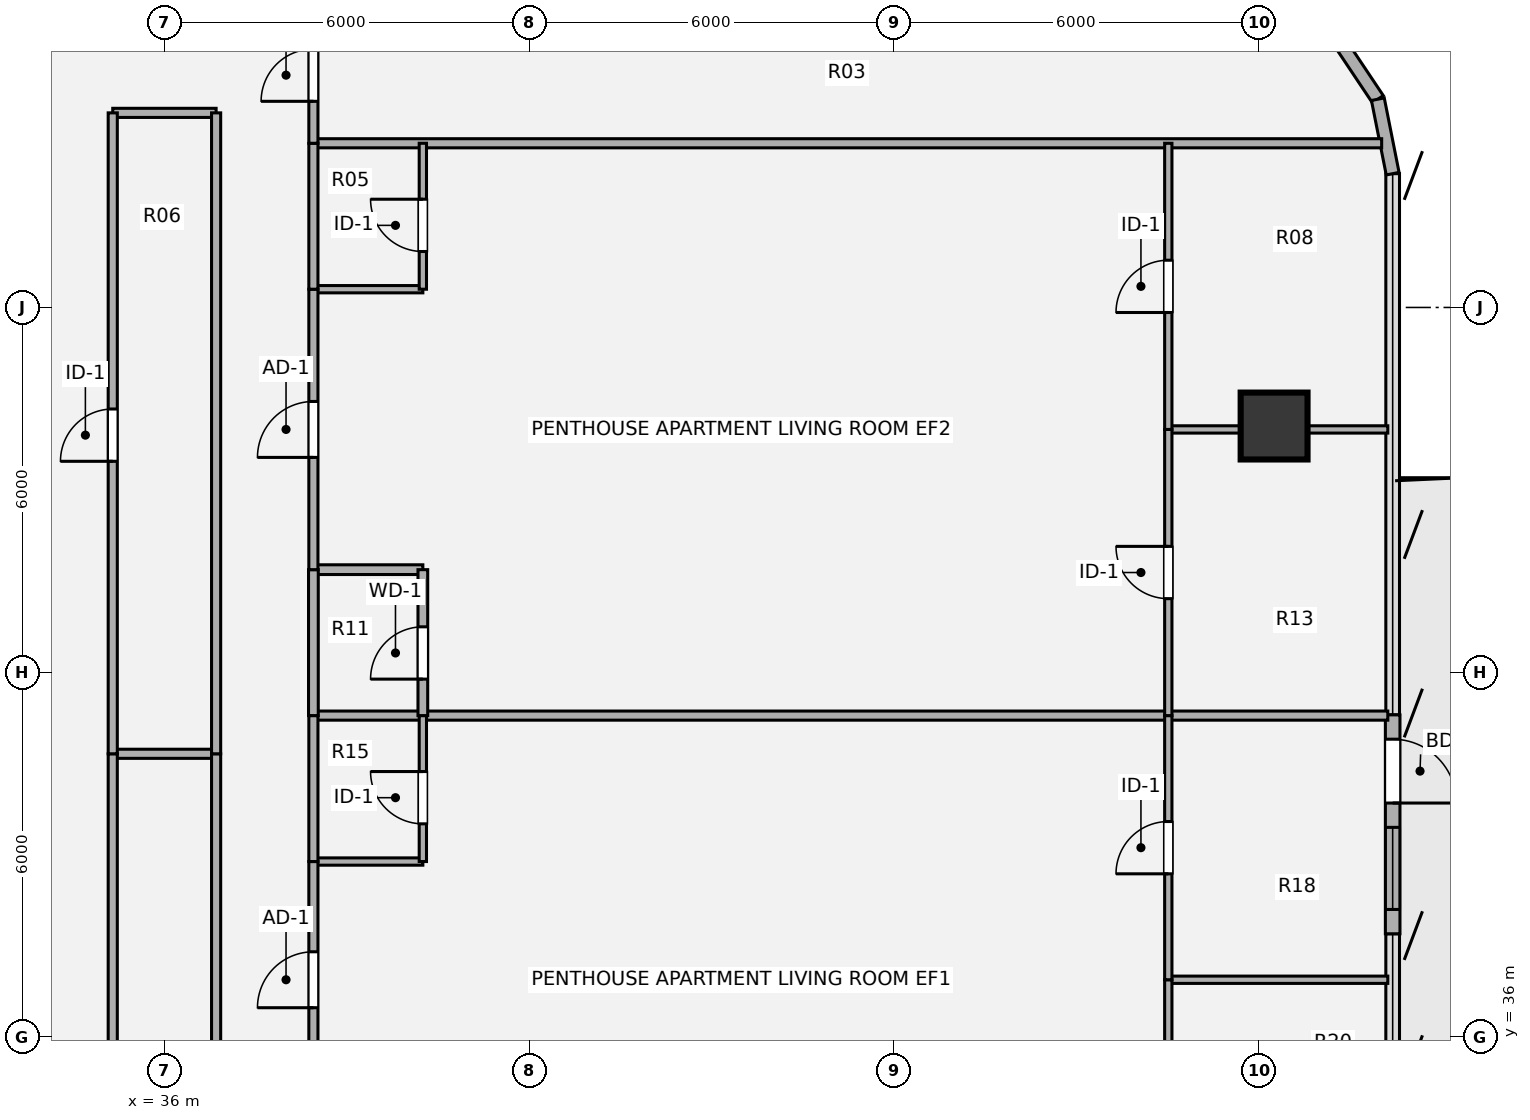
"""IFC4 building model, lengths in metres.
Left out: names, types, materials, properties, quantities, classifications, styles, units other than length and angle.
Written with IfcOpenShell. Run it as: python <this file> out.ifc"""

import sys

from ifc_helpers import new_model, si_unit, direction, frame, frame_2d, origin, origin_2d, place, context, subcontext, project, spatial, rectangle, hollow_circle, extrude, source, transform, mapped, element, fill, save


model = new_model("IFC4")
c1 = context("Model", 3, precision=1e-05, world=origin(), true_north=direction((0.0, 1.0)))
c2 = subcontext(c1, "Body", "Model", "MODEL_VIEW")
j1 = project(units=[si_unit("LENGTHUNIT", "METRE"), si_unit("PLANEANGLEUNIT", "RADIAN")], contexts=[c1])
p1 = place(None, origin())
s1 = spatial("IfcSite", under=j1, at=p1, CompositionType="ELEMENT")
p2 = place(p1, origin())
s2 = spatial("IfcBuilding", under=s1, at=p2, CompositionType="ELEMENT")
p3 = place(p2, frame((0.0, 0.0, 163.98)))
s3 = spatial("IfcBuildingStorey", under=s2, at=p3, CompositionType="ELEMENT", Elevation=163.98)
m1 = source(origin(), c2, "Body", "SweptSolid", [
    extrude(hollow_circle(Radius=0.55, WallThickness=0.04, at=origin_2d()), origin(), (0.0, 0.0, 1.0), 3.78),
])
p4 = place(p3, frame((54.25, 46.05, 0.0), z_axis=(0.0, 0.0, 1.0), x_axis=(1.0, 0.0, 0.0)))
e1 = element("IfcColumn", 1, at=p4, inside=s3, PredefinedType="COLUMN", context=c2, shape_type="MappedRepresentation", body=[
    mapped(m1, transform((0.0, 0.0, 0.0), x_axis=(1.0, 0.0, 0.0), y_axis=(0.0, 1.0, 0.0), z_axis=(0.0, 0.0, 1.0), scale=1.0)),
])
for number, where, z_axis, x_axis in (
    (2, (55.263, 52.463, 0.0), (0.0, 0.0, 1.0), (0.556, -0.831, 0.0)),
    (3, (55.956, 51.425, 0.0), (0.0, 0.0, 1.0), (0.195, -0.981, 0.0)),
):
    element("IfcWall", number, at=place(p3, frame(where, z_axis=z_axis, x_axis=x_axis)), inside=s3, PredefinedType="SOLIDWALL", context=c2, shape_type="SweptSolid", body=[
        extrude(rectangle(XDim=1.249, YDim=0.215, at=frame_2d((0.624, 0.0))), origin(), (0.0, 0.0, 1.0), 3.53),
    ])
p5 = place(p3, frame((56.2, 41.3, 0.0), z_axis=(0.0, 0.0, 1.0), x_axis=(0.0, -1.0, 0.0)))
e4 = element("IfcWall", 4, at=p5, inside=s3, PredefinedType="SOLIDWALL", context=c2, shape_type="SweptSolid", body=[
    extrude(rectangle(XDim=3.6, YDim=0.24, at=frame_2d((1.8, 0.0))), origin(), (0.0, 0.0, 1.0), 3.53),
])
p6 = place(p5, frame((0.4, 0.0, 0.0)))
e5 = element("IfcOpeningElement", 5, at=p6, cuts=e4, PredefinedType="OPENING", context=c2, shape_type="SweptSolid", body=[
    extrude(rectangle(XDim=1.05, YDim=2.15, at=origin_2d()), frame((0.525, 0.13, 1.075), z_axis=(0.0, -1.0, 0.0), x_axis=(1.0, 0.0, 0.0)), (0.0, 0.0, 1.0), 0.26),
])
p7 = place(p5, frame((1.85, 0.0, 0.85)))
e6 = element("IfcOpeningElement", 6, at=p7, cuts=e4, PredefinedType="OPENING", context=c2, shape_type="SweptSolid", body=[
    extrude(rectangle(XDim=1.35, YDim=1.35, at=origin_2d()), frame((0.675, 0.13, 0.675), z_axis=(0.0, -1.0, 0.0), x_axis=(1.0, 0.0, 0.0)), (0.0, 0.0, 1.0), 0.26),
])
p8 = place(p3, frame((52.51, 36.944, 0.0), z_axis=(0.0, 0.0, 1.0), x_axis=(1.0, 0.0, 0.0)))
e7 = element("IfcWall", 7, at=p8, inside=s3, PredefinedType="PARTITIONING", context=c2, shape_type="SweptSolid", body=[
    extrude(rectangle(XDim=3.61, YDim=0.12, at=frame_2d((1.805, 0.0))), origin(), (0.0, 0.0, 1.0), 2.982),
])
p9 = place(p3, frame((38.45, 38.888, 0.0), z_axis=(0.0, 0.0, 1.0), x_axis=(1.0, 0.0, 0.0)))
e8 = element("IfcWall", 8, at=p9, inside=s3, PredefinedType="PARTITIONING", context=c2, shape_type="SweptSolid", body=[
    extrude(rectangle(XDim=1.8, YDim=0.12, at=frame_2d((0.9, 0.0))), origin(), (0.0, 0.0, 1.0), 3.259),
])
p10 = place(p3, frame((35.15, 40.66, 0.0), z_axis=(0.0, 0.0, 1.0), x_axis=(1.0, 0.0, 0.0)))
e9 = element("IfcWall", 9, at=p10, inside=s3, PredefinedType="PARTITIONING", context=c2, shape_type="SweptSolid", body=[
    extrude(rectangle(XDim=1.7, YDim=0.15, at=frame_2d((0.85, 0.0))), origin(), (0.0, 0.0, 1.0), 3.259),
])
p11 = place(p3, frame((38.45, 41.288, 0.0), z_axis=(0.0, 0.0, 1.0), x_axis=(1.0, 0.0, 0.0)))
e10 = element("IfcWall", 10, at=p11, inside=s3, PredefinedType="PARTITIONING", context=c2, shape_type="SweptSolid", body=[
    extrude(rectangle(XDim=17.67, YDim=0.15, at=frame_2d((8.835, 0.0))), origin(), (0.0, 0.0, 1.0), 2.982),
])
p12 = place(p3, frame((38.45, 43.688, 0.0), z_axis=(0.0, 0.0, 1.0), x_axis=(1.0, 0.0, 0.0)))
e11 = element("IfcWall", 11, at=p12, inside=s3, PredefinedType="PLUMBINGWALL", context=c2, shape_type="SweptSolid", body=[
    extrude(rectangle(XDim=1.8, YDim=0.16, at=frame_2d((0.9, 0.0))), origin(), (0.0, 0.0, 1.0), 3.259),
])
p13 = place(p3, frame((52.51, 45.994, 0.0), z_axis=(0.0, 0.0, 1.0), x_axis=(1.0, 0.0, 0.0)))
e12 = element("IfcWall", 12, at=p13, inside=s3, PredefinedType="PARTITIONING", context=c2, shape_type="SweptSolid", body=[
    extrude(rectangle(XDim=3.61, YDim=0.12, at=frame_2d((1.805, 0.0))), origin(), (0.0, 0.0, 1.0), 2.903),
])
p14 = place(p3, frame((38.45, 48.3, 0.0), z_axis=(0.0, 0.0, 1.0), x_axis=(1.0, 0.0, 0.0)))
e13 = element("IfcWall", 13, at=p14, inside=s3, PredefinedType="PARTITIONING", context=c2, shape_type="SweptSolid", body=[
    extrude(rectangle(XDim=1.8, YDim=0.12, at=frame_2d((0.9, 0.0))), origin(), (0.0, 0.0, 1.0), 3.259),
])
p15 = place(p3, frame((38.45, 50.7, 0.0), z_axis=(0.0, 0.0, 1.0), x_axis=(1.0, 0.0, 0.0)))
e14 = element("IfcWall", 14, at=p15, inside=s3, PredefinedType="PARTITIONING", context=c2, shape_type="SweptSolid", body=[
    extrude(rectangle(XDim=17.569, YDim=0.15, at=frame_2d((8.785, 0.0))), origin(), (0.0, 0.0, 1.0), 3.308),
])
p16 = place(p3, frame((35.15, 51.2, 0.0), z_axis=(0.0, 0.0, 1.0), x_axis=(1.0, 0.0, 0.0)))
e15 = element("IfcWall", 15, at=p16, inside=s3, PredefinedType="PARTITIONING", context=c2, shape_type="SweptSolid", body=[
    extrude(rectangle(XDim=1.7, YDim=0.15, at=frame_2d((0.85, 0.0))), origin(), (0.0, 0.0, 1.0), 3.308),
])
p17 = place(p3, frame((35.15, 25.2, 0.0), z_axis=(0.0, 0.0, 1.0), x_axis=(0.0, 1.0, 0.0)))
e16 = element("IfcWall", 16, at=p17, inside=s3, PredefinedType="PARTITIONING", context=c2, shape_type="SweptSolid", body=[
    extrude(rectangle(XDim=15.46, YDim=0.15, at=frame_2d((7.73, 0.0))), origin(), (0.0, 0.0, 1.0), 3.5),
])
p18 = place(p3, frame((35.15, 40.66, 0.0), z_axis=(0.0, 0.0, 1.0), x_axis=(0.0, 1.0, 0.0)))
e17 = element("IfcWall", 17, at=p18, inside=s3, PredefinedType="PARTITIONING", context=c2, shape_type="SweptSolid", body=[
    extrude(rectangle(XDim=10.54, YDim=0.15, at=frame_2d((5.27, 0.0))), origin(), (0.0, 0.0, 1.0), 3.5),
])
p19 = place(p18, frame((4.81, 0.0, 0.0)))
e18 = element("IfcOpeningElement", 18, at=p19, cuts=e17, PredefinedType="OPENING", context=c2, shape_type="SweptSolid", body=[
    extrude(rectangle(XDim=0.86, YDim=2.1, at=origin_2d()), frame((0.43, 0.085, 1.05), z_axis=(0.0, -1.0, 0.0), x_axis=(1.0, 0.0, 0.0)), (0.0, 0.0, 1.0), 0.17),
])
p20 = place(p3, frame((36.85, 25.2, 0.0), z_axis=(0.0, 0.0, 1.0), x_axis=(0.0, 1.0, 0.0)))
e19 = element("IfcWall", 19, at=p20, inside=s3, PredefinedType="PARTITIONING", context=c2, shape_type="SweptSolid", body=[
    extrude(rectangle(XDim=15.46, YDim=0.15, at=frame_2d((7.73, 0.0))), origin(), (0.0, 0.0, 1.0), 3.5),
])
p21 = place(p20, frame((7.205, 0.0, 0.0)))
e20 = element("IfcOpeningElement", 20, at=p21, cuts=e19, PredefinedType="OPENING", context=c2, shape_type="SweptSolid", body=[
    extrude(rectangle(XDim=1.05, YDim=2.1, at=origin_2d()), frame((0.525, 0.085, 1.05), z_axis=(0.0, -1.0, 0.0), x_axis=(1.0, 0.0, 0.0)), (0.0, 0.0, 1.0), 0.17),
])
p22 = place(p3, frame((36.85, 40.66, 0.0), z_axis=(0.0, 0.0, 1.0), x_axis=(0.0, 1.0, 0.0)))
e21 = element("IfcWall", 21, at=p22, inside=s3, PredefinedType="PARTITIONING", context=c2, shape_type="SweptSolid", body=[
    extrude(rectangle(XDim=10.54, YDim=0.15, at=frame_2d((5.27, 0.0))), origin(), (0.0, 0.0, 1.0), 3.5),
])
p23 = place(p3, frame((38.45, 35.0, 0.0), z_axis=(0.0, 0.0, 1.0), x_axis=(0.0, 1.0, 0.0)))
e22 = element("IfcWall", 22, at=p23, inside=s3, PredefinedType="PARTITIONING", context=c2, shape_type="SweptSolid", body=[
    extrude(rectangle(XDim=3.888, YDim=0.15, at=frame_2d((1.944, 0.0))), origin(), (0.0, 0.0, 1.0), 3.5),
])
p24 = place(p23, frame((1.484, 0.0, 0.0)))
e23 = element("IfcOpeningElement", 23, at=p24, cuts=e22, PredefinedType="OPENING", context=c2, shape_type="SweptSolid", body=[
    extrude(rectangle(XDim=0.92, YDim=2.1, at=origin_2d()), frame((0.46, 0.085, 1.05), z_axis=(0.0, -1.0, 0.0), x_axis=(1.0, 0.0, 0.0)), (0.0, 0.0, 1.0), 0.17),
])
p25 = place(p3, frame((38.45, 38.888, 0.0), z_axis=(0.0, 0.0, 1.0), x_axis=(0.0, 1.0, 0.0)))
e24 = element("IfcWall", 24, at=p25, inside=s3, PredefinedType="PARTITIONING", context=c2, shape_type="SweptSolid", body=[
    extrude(rectangle(XDim=2.4, YDim=0.15, at=frame_2d((1.2, 0.0))), origin(), (0.0, 0.0, 1.0), 3.5),
])
p26 = place(p3, frame((38.45, 41.288, 0.0), z_axis=(0.0, 0.0, 1.0), x_axis=(0.0, 1.0, 0.0)))
e25 = element("IfcWall", 25, at=p26, inside=s3, PredefinedType="PLUMBINGWALL", context=c2, shape_type="SweptSolid", body=[
    extrude(rectangle(XDim=2.4, YDim=0.16, at=frame_2d((1.2, 0.0))), origin(), (0.0, 0.0, 1.0), 3.5),
])
p27 = place(p3, frame((38.45, 43.688, 0.0), z_axis=(0.0, 0.0, 1.0), x_axis=(0.0, 1.0, 0.0)))
e26 = element("IfcWall", 26, at=p27, inside=s3, PredefinedType="PARTITIONING", context=c2, shape_type="SweptSolid", body=[
    extrude(rectangle(XDim=4.612, YDim=0.15, at=frame_2d((2.306, 0.0))), origin(), (0.0, 0.0, 1.0), 3.5),
])
p28 = place(p27, frame((1.846, 0.0, 0.0)))
e27 = element("IfcOpeningElement", 27, at=p28, cuts=e26, PredefinedType="OPENING", context=c2, shape_type="SweptSolid", body=[
    extrude(rectangle(XDim=0.92, YDim=2.1, at=origin_2d()), frame((0.46, 0.085, 1.05), z_axis=(0.0, -1.0, 0.0), x_axis=(1.0, 0.0, 0.0)), (0.0, 0.0, 1.0), 0.17),
])
p29 = place(p3, frame((38.45, 48.3, 0.0), z_axis=(0.0, 0.0, 1.0), x_axis=(0.0, 1.0, 0.0)))
e28 = element("IfcWall", 28, at=p29, inside=s3, PredefinedType="PARTITIONING", context=c2, shape_type="SweptSolid", body=[
    extrude(rectangle(XDim=2.4, YDim=0.15, at=frame_2d((1.2, 0.0))), origin(), (0.0, 0.0, 1.0), 3.5),
])
p30 = place(p3, frame((38.45, 50.7, 0.0), z_axis=(0.0, 0.0, 1.0), x_axis=(0.0, 1.0, 0.0)))
e29 = element("IfcWall", 29, at=p30, inside=s3, PredefinedType="PARTITIONING", context=c2, shape_type="SweptSolid", body=[
    extrude(rectangle(XDim=2.3, YDim=0.15, at=frame_2d((1.15, 0.0))), origin(), (0.0, 0.0, 1.0), 3.5),
])
p31 = place(p30, frame((0.69, 0.0, 0.0)))
e30 = element("IfcOpeningElement", 30, at=p31, cuts=e29, PredefinedType="OPENING", context=c2, shape_type="SweptSolid", body=[
    extrude(rectangle(XDim=0.86, YDim=2.1, at=origin_2d()), frame((0.43, 0.085, 1.05), z_axis=(0.0, -1.0, 0.0), x_axis=(1.0, 0.0, 0.0)), (0.0, 0.0, 1.0), 0.17),
])
p32 = place(p3, frame((40.25, 38.888, 0.0), z_axis=(0.0, 0.0, 1.0), x_axis=(0.0, 1.0, 0.0)))
e31 = element("IfcWall", 31, at=p32, inside=s3, PredefinedType="PARTITIONING", context=c2, shape_type="SweptSolid", body=[
    extrude(rectangle(XDim=2.4, YDim=0.12, at=frame_2d((1.2, 0.0))), origin(), (0.0, 0.0, 1.0), 3.5),
])
p33 = place(p32, frame((0.62, 0.0, 0.0)))
e32 = element("IfcOpeningElement", 32, at=p33, cuts=e31, PredefinedType="OPENING", context=c2, shape_type="SweptSolid", body=[
    extrude(rectangle(XDim=0.86, YDim=2.1, at=origin_2d()), frame((0.43, 0.07, 1.05), z_axis=(0.0, -1.0, 0.0), x_axis=(1.0, 0.0, 0.0)), (0.0, 0.0, 1.0), 0.14),
])
p34 = place(p3, frame((40.25, 41.288, 0.0), z_axis=(0.0, 0.0, 1.0), x_axis=(0.0, 1.0, 0.0)))
e33 = element("IfcWall", 33, at=p34, inside=s3, PredefinedType="PLUMBINGWALL", context=c2, shape_type="SweptSolid", body=[
    extrude(rectangle(XDim=2.4, YDim=0.16, at=frame_2d((1.2, 0.0))), origin(), (0.0, 0.0, 1.0), 3.5),
])
p35 = place(p34, frame((0.6, 0.0, 0.0)))
e34 = element("IfcOpeningElement", 34, at=p35, cuts=e33, PredefinedType="OPENING", context=c2, shape_type="SweptSolid", body=[
    extrude(rectangle(XDim=0.86, YDim=2.1, at=origin_2d()), frame((0.43, 0.09, 1.05), z_axis=(0.0, -1.0, 0.0), x_axis=(1.0, 0.0, 0.0)), (0.0, 0.0, 1.0), 0.18),
])
p36 = place(p3, frame((40.25, 48.3, 0.0), z_axis=(0.0, 0.0, 1.0), x_axis=(0.0, 1.0, 0.0)))
e35 = element("IfcWall", 35, at=p36, inside=s3, PredefinedType="PARTITIONING", context=c2, shape_type="SweptSolid", body=[
    extrude(rectangle(XDim=2.4, YDim=0.12, at=frame_2d((1.2, 0.0))), origin(), (0.0, 0.0, 1.0), 3.5),
])
p37 = place(p36, frame((0.62, 0.0, 0.0)))
e36 = element("IfcOpeningElement", 36, at=p37, cuts=e35, PredefinedType="OPENING", context=c2, shape_type="SweptSolid", body=[
    extrude(rectangle(XDim=0.86, YDim=2.1, at=origin_2d()), frame((0.43, 0.07, 1.05), z_axis=(0.0, -1.0, 0.0), x_axis=(1.0, 0.0, 0.0)), (0.0, 0.0, 1.0), 0.14),
])
p38 = place(p3, frame((52.51, 32.48, 0.0), z_axis=(0.0, 0.0, 1.0), x_axis=(0.0, 1.0, 0.0)))
e37 = element("IfcWall", 37, at=p38, inside=s3, PredefinedType="PARTITIONING", context=c2, shape_type="SweptSolid", body=[
    extrude(rectangle(XDim=4.464, YDim=0.12, at=frame_2d((2.232, 0.0))), origin(), (0.0, 0.0, 1.0), 3.5),
])
p39 = place(p38, frame((0.362, 0.0, 0.0)))
e38 = element("IfcOpeningElement", 38, at=p39, cuts=e37, PredefinedType="OPENING", context=c2, shape_type="SweptSolid", body=[
    extrude(rectangle(XDim=0.86, YDim=2.1, at=origin_2d()), frame((0.43, 0.07, 1.05), z_axis=(0.0, -1.0, 0.0), x_axis=(1.0, 0.0, 0.0)), (0.0, 0.0, 1.0), 0.14),
])
p40 = place(p3, frame((52.51, 36.944, 0.0), z_axis=(0.0, 0.0, 1.0), x_axis=(0.0, 1.0, 0.0)))
e39 = element("IfcWall", 39, at=p40, inside=s3, PredefinedType="PARTITIONING", context=c2, shape_type="SweptSolid", body=[
    extrude(rectangle(XDim=4.344, YDim=0.12, at=frame_2d((2.172, 0.0))), origin(), (0.0, 0.0, 1.0), 3.5),
])
p41 = place(p40, frame((1.742, 0.0, 0.0)))
e40 = element("IfcOpeningElement", 40, at=p41, cuts=e39, PredefinedType="OPENING", context=c2, shape_type="SweptSolid", body=[
    extrude(rectangle(XDim=0.86, YDim=2.1, at=origin_2d()), frame((0.43, 0.07, 1.05), z_axis=(0.0, -1.0, 0.0), x_axis=(1.0, 0.0, 0.0)), (0.0, 0.0, 1.0), 0.14),
])
p42 = place(p3, frame((52.51, 41.288, 0.0), z_axis=(0.0, 0.0, 1.0), x_axis=(0.0, 1.0, 0.0)))
e41 = element("IfcWall", 41, at=p42, inside=s3, PredefinedType="PARTITIONING", context=c2, shape_type="SweptSolid", body=[
    extrude(rectangle(XDim=4.706, YDim=0.12, at=frame_2d((2.353, 0.0))), origin(), (0.0, 0.0, 1.0), 3.5),
])
p43 = place(p42, frame((1.923, 0.0, 0.0)))
e42 = element("IfcOpeningElement", 42, at=p43, cuts=e41, PredefinedType="OPENING", context=c2, shape_type="SweptSolid", body=[
    extrude(rectangle(XDim=0.86, YDim=2.1, at=origin_2d()), frame((0.43, 0.07, 1.05), z_axis=(0.0, -1.0, 0.0), x_axis=(1.0, 0.0, 0.0)), (0.0, 0.0, 1.0), 0.14),
])
p44 = place(p3, frame((52.51, 45.994, 0.0), z_axis=(0.0, 0.0, 1.0), x_axis=(0.0, 1.0, 0.0)))
e43 = element("IfcWall", 43, at=p44, inside=s3, PredefinedType="PARTITIONING", context=c2, shape_type="SweptSolid", body=[
    extrude(rectangle(XDim=4.706, YDim=0.12, at=frame_2d((2.353, 0.0))), origin(), (0.0, 0.0, 1.0), 3.5),
])
p45 = place(p44, frame((1.923, 0.0, 0.0)))
e44 = element("IfcOpeningElement", 44, at=p45, cuts=e43, PredefinedType="OPENING", context=c2, shape_type="SweptSolid", body=[
    extrude(rectangle(XDim=0.86, YDim=2.1, at=origin_2d()), frame((0.43, 0.07, 1.05), z_axis=(0.0, -1.0, 0.0), x_axis=(1.0, 0.0, 0.0)), (0.0, 0.0, 1.0), 0.14),
])
m2 = source(origin(), c2, "Body", "SweptSolid", [
    extrude(rectangle(XDim=1.05, YDim=2.15, at=origin_2d()), frame((0.525, 0.025, 1.075), z_axis=(0.0, -1.0, 0.0), x_axis=(1.0, 0.0, 0.0)), (0.0, 0.0, 1.0), 0.05),
])
p46 = place(p6, origin())
e45 = element("IfcDoor", 45, at=p46, inside=s3, OperationType="SINGLE_SWING_RIGHT", PredefinedType="DOOR", context=c2, shape_type="MappedRepresentation", body=[
    mapped(m2, transform((0.0, 0.0, 0.0), x_axis=(1.0, 0.0, 0.0), y_axis=(0.0, 1.0, 0.0), z_axis=(0.0, 0.0, 1.0), scale=1.0)),
])
fill(e5, e45)
m3 = source(origin(), c2, "Body", "SweptSolid", [
    extrude(rectangle(XDim=1.35, YDim=1.35, at=origin_2d()), frame((0.675, 0.03, 0.675), z_axis=(0.0, -1.0, 0.0), x_axis=(1.0, 0.0, 0.0)), (0.0, 0.0, 1.0), 0.06),
])
p47 = place(p7, origin())
e46 = element("IfcWindow", 46, at=p47, inside=s3, PartitioningType="SINGLE_PANEL", PredefinedType="WINDOW", context=c2, shape_type="MappedRepresentation", body=[
    mapped(m3, transform((0.0, 0.0, 0.0), x_axis=(1.0, 0.0, 0.0), y_axis=(0.0, 1.0, 0.0), z_axis=(0.0, 0.0, 1.0), scale=1.0)),
])
fill(e6, e46)
m4 = source(origin(), c2, "Body", "SweptSolid", [
    extrude(rectangle(XDim=0.86, YDim=2.1, at=origin_2d()), frame((0.43, 0.025, 1.05), z_axis=(0.0, -1.0, 0.0), x_axis=(1.0, 0.0, 0.0)), (0.0, 0.0, 1.0), 0.05),
])
p48 = place(p19, origin())
e47 = element("IfcDoor", 47, at=p48, inside=s3, OperationType="SINGLE_SWING_LEFT", PredefinedType="DOOR", context=c2, shape_type="MappedRepresentation", body=[
    mapped(m4, transform((0.0, 0.0, 0.0), x_axis=(1.0, 0.0, 0.0), y_axis=(0.0, 1.0, 0.0), z_axis=(0.0, 0.0, 1.0), scale=1.0)),
])
fill(e18, e47)
m5 = source(origin(), c2, "Body", "SweptSolid", [
    extrude(rectangle(XDim=0.92, YDim=2.1, at=origin_2d()), frame((0.46, 0.025, 1.05), z_axis=(0.0, -1.0, 0.0), x_axis=(1.0, 0.0, 0.0)), (0.0, 0.0, 1.0), 0.05),
])
p49 = place(p24, origin())
e48 = element("IfcDoor", 48, at=p49, inside=s3, OperationType="SINGLE_SWING_LEFT", PredefinedType="DOOR", context=c2, shape_type="MappedRepresentation", body=[
    mapped(m5, transform((0.0, 0.0, 0.0), x_axis=(1.0, 0.0, 0.0), y_axis=(0.0, 1.0, 0.0), z_axis=(0.0, 0.0, 1.0), scale=1.0)),
])
fill(e23, e48)
p50 = place(p28, origin())
e49 = element("IfcDoor", 49, at=p50, inside=s3, OperationType="SINGLE_SWING_LEFT", PredefinedType="DOOR", context=c2, shape_type="MappedRepresentation", body=[
    mapped(m5, transform((0.0, 0.0, 0.0), x_axis=(1.0, 0.0, 0.0), y_axis=(0.0, 1.0, 0.0), z_axis=(0.0, 0.0, 1.0), scale=1.0)),
])
fill(e27, e49)
p51 = place(p31, origin())
e50 = element("IfcDoor", 50, at=p51, inside=s3, OperationType="SINGLE_SWING_LEFT", PredefinedType="DOOR", context=c2, shape_type="MappedRepresentation", body=[
    mapped(m4, transform((0.0, 0.0, 0.0), x_axis=(1.0, 0.0, 0.0), y_axis=(0.0, 1.0, 0.0), z_axis=(0.0, 0.0, 1.0), scale=1.0)),
])
fill(e30, e50)
p52 = place(p33, origin())
e51 = element("IfcDoor", 51, at=p52, inside=s3, OperationType="SINGLE_SWING_RIGHT", PredefinedType="DOOR", context=c2, shape_type="MappedRepresentation", body=[
    mapped(m4, transform((0.0, 0.0, 0.0), x_axis=(1.0, 0.0, 0.0), y_axis=(0.0, 1.0, 0.0), z_axis=(0.0, 0.0, 1.0), scale=1.0)),
])
fill(e32, e51)
m6 = source(origin(), c2, "Body", "SweptSolid", [
    extrude(rectangle(XDim=0.86, YDim=2.1, at=origin_2d()), frame((0.43, 0.025, 1.05), z_axis=(0.0, -1.0, 0.0), x_axis=(1.0, 0.0, 0.0)), (0.0, 0.0, 1.0), 0.05),
])
p53 = place(p35, origin())
e52 = element("IfcDoor", 52, at=p53, inside=s3, OperationType="SINGLE_SWING_LEFT", PredefinedType="DOOR", context=c2, shape_type="MappedRepresentation", body=[
    mapped(m6, transform((0.0, 0.0, 0.0), x_axis=(1.0, 0.0, 0.0), y_axis=(0.0, 1.0, 0.0), z_axis=(0.0, 0.0, 1.0), scale=1.0)),
])
fill(e34, e52)
p54 = place(p37, origin())
e53 = element("IfcDoor", 53, at=p54, inside=s3, OperationType="SINGLE_SWING_RIGHT", PredefinedType="DOOR", context=c2, shape_type="MappedRepresentation", body=[
    mapped(m4, transform((0.0, 0.0, 0.0), x_axis=(1.0, 0.0, 0.0), y_axis=(0.0, 1.0, 0.0), z_axis=(0.0, 0.0, 1.0), scale=1.0)),
])
fill(e36, e53)
p55 = place(p41, origin())
e54 = element("IfcDoor", 54, at=p55, inside=s3, OperationType="SINGLE_SWING_LEFT", PredefinedType="DOOR", context=c2, shape_type="MappedRepresentation", body=[
    mapped(m4, transform((0.0, 0.0, 0.0), x_axis=(1.0, 0.0, 0.0), y_axis=(0.0, 1.0, 0.0), z_axis=(0.0, 0.0, 1.0), scale=1.0)),
])
fill(e40, e54)
p56 = place(p43, origin())
e55 = element("IfcDoor", 55, at=p56, inside=s3, OperationType="SINGLE_SWING_RIGHT", PredefinedType="DOOR", context=c2, shape_type="MappedRepresentation", body=[
    mapped(m4, transform((0.0, 0.0, 0.0), x_axis=(1.0, 0.0, 0.0), y_axis=(0.0, 1.0, 0.0), z_axis=(0.0, 0.0, 1.0), scale=1.0)),
])
fill(e42, e55)
p57 = place(p45, origin())
e56 = element("IfcDoor", 56, at=p57, inside=s3, OperationType="SINGLE_SWING_LEFT", PredefinedType="DOOR", context=c2, shape_type="MappedRepresentation", body=[
    mapped(m4, transform((0.0, 0.0, 0.0), x_axis=(1.0, 0.0, 0.0), y_axis=(0.0, 1.0, 0.0), z_axis=(0.0, 0.0, 1.0), scale=1.0)),
])
fill(e44, e56)
save(model, sys.argv[1])
